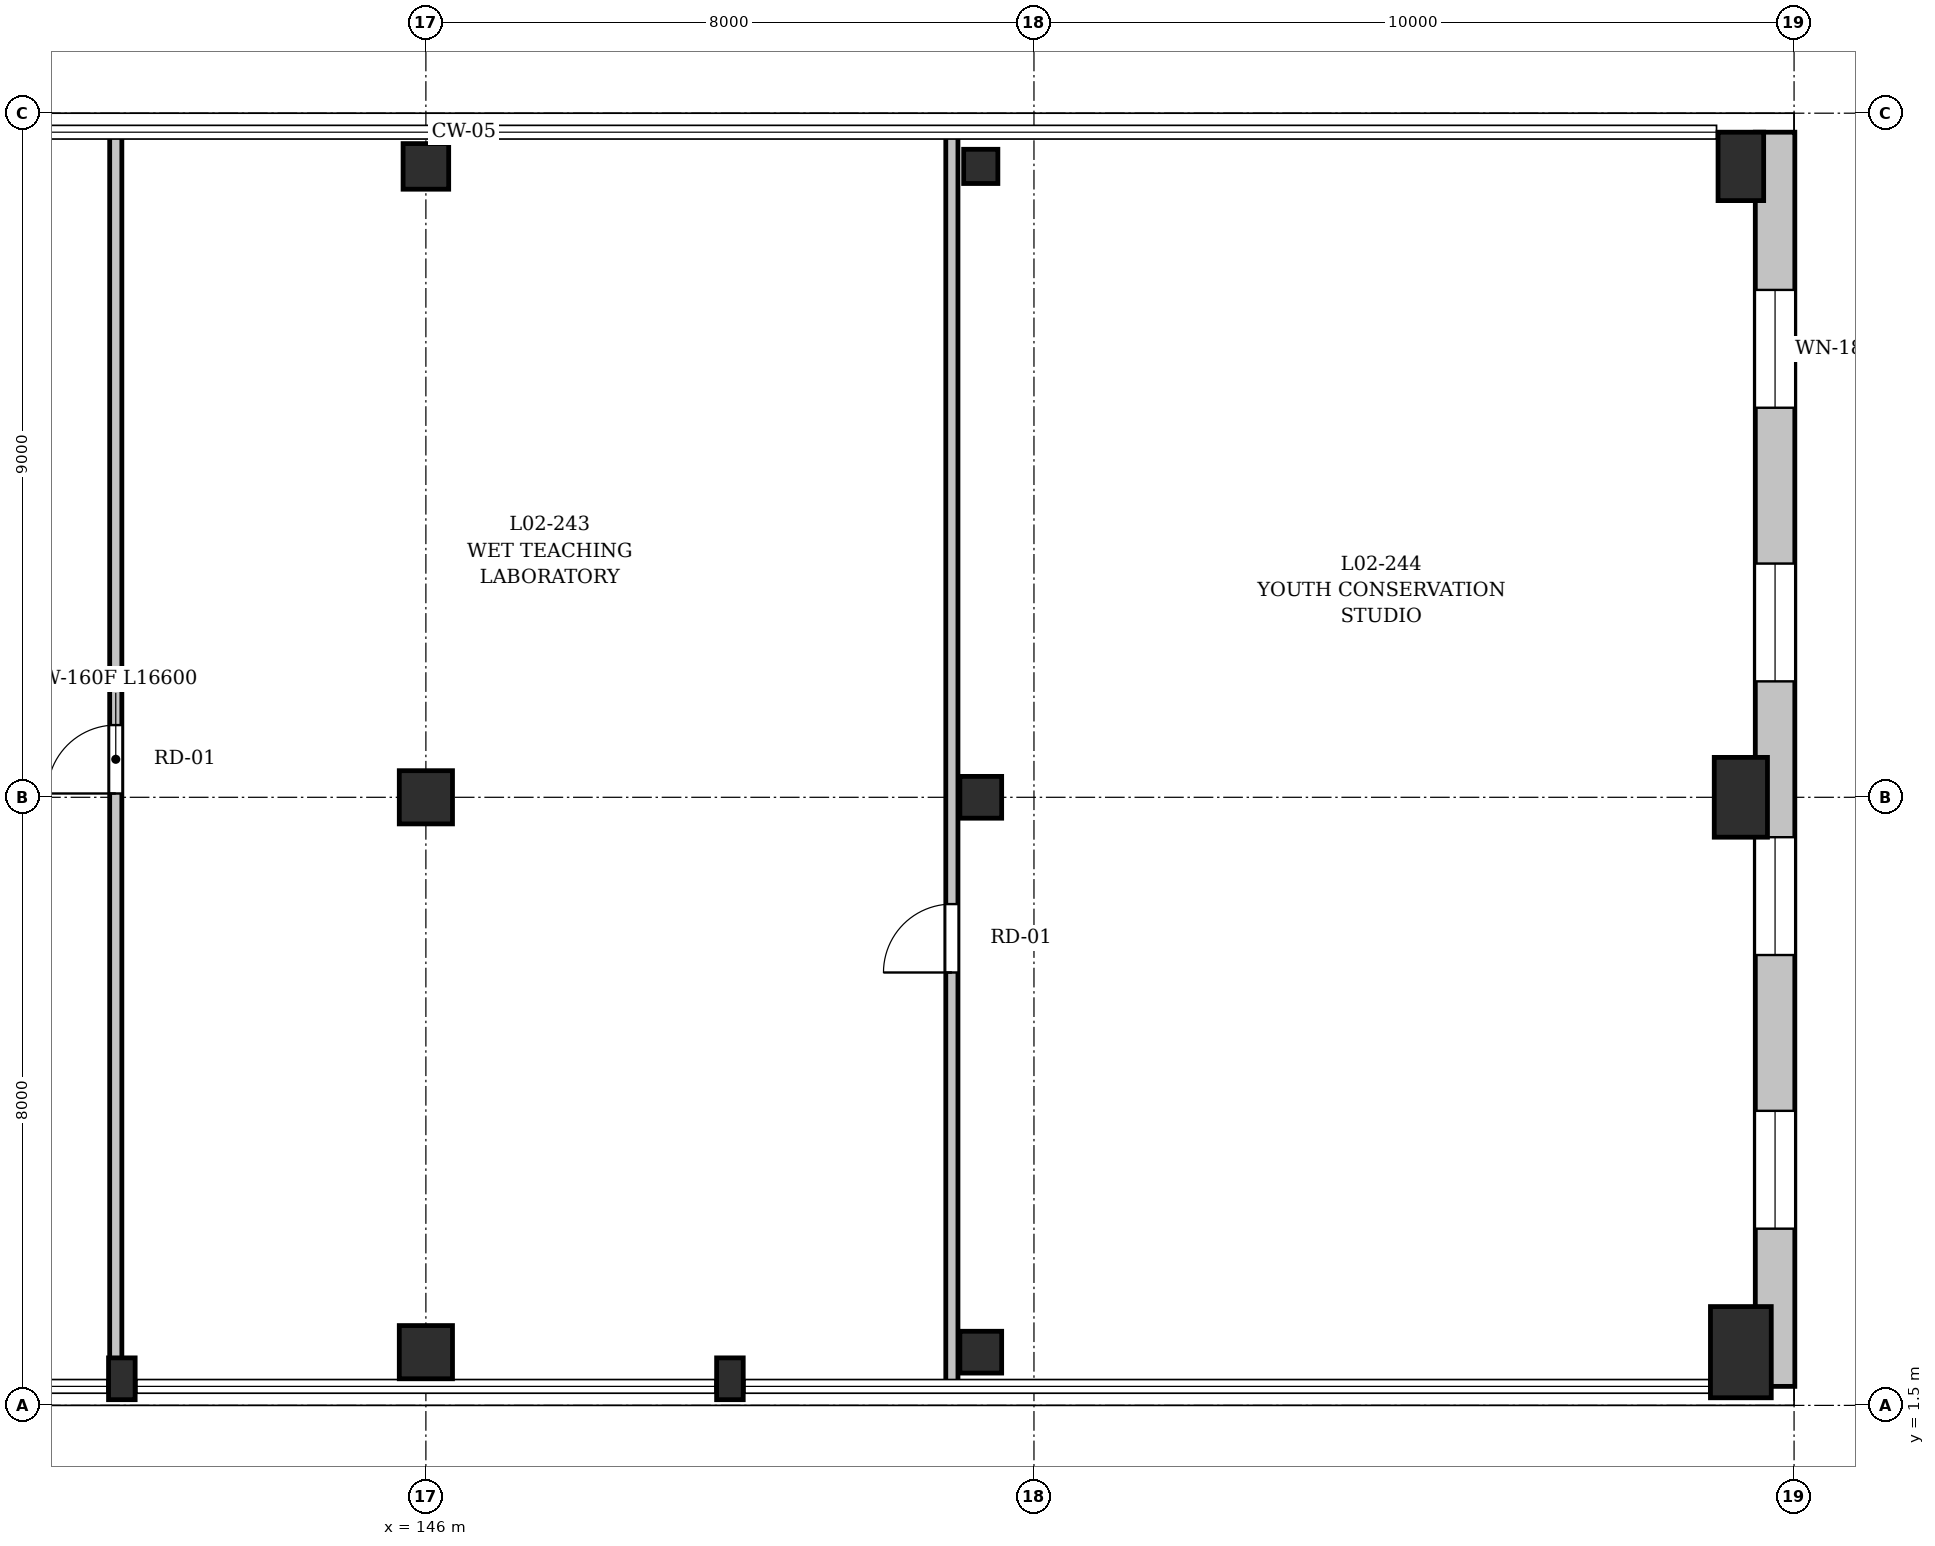
"""IFC4 building model, lengths in metres.
Left out: names, types, materials, properties, quantities, classifications, styles, units other than length and angle.
Written with IfcOpenShell. Run it as: python <this file> out.ifc"""

import sys

from ifc_helpers import new_model, si_unit, direction, frame, frame_2d, origin, origin_2d, place, context, subcontext, project, spatial, rectangle, extrude, element, fill, save


model = new_model("IFC4")
c1 = context("Model", 3, precision=1e-05, world=origin(), true_north=direction((0.0, 1.0)))
c2 = subcontext(c1, "Body", "Model", "MODEL_VIEW")
j1 = project(units=[si_unit("LENGTHUNIT", "METRE"), si_unit("PLANEANGLEUNIT", "RADIAN")], contexts=[c1])
p1 = place(None, origin())
s1 = spatial("IfcSite", under=j1, at=p1, CompositionType="ELEMENT")
p2 = place(p1, origin())
s2 = spatial("IfcBuilding", under=s1, at=p2, CompositionType="ELEMENT")
p3 = place(p2, frame((0.0, 0.0, 5.4)))
s3 = spatial("IfcBuildingStorey", under=s2, at=p3, CompositionType="ELEMENT", Elevation=5.4)
for number, where, z_axis, x_axis in (
    (1, (146.0, 2.2, 0.0), (0.0, 0.0, 1.0), (1.0, 0.0, 0.0)),
    (2, (146.0, 9.5, 0.0), (0.0, 0.0, 1.0), (1.0, 0.0, 0.0)),
):
    element("IfcColumn", number, at=place(p3, frame(where, z_axis=z_axis, x_axis=x_axis)), inside=s3, PredefinedType="COLUMN", context=c2, shape_type="SweptSolid", body=[
        extrude(rectangle(XDim=0.7, YDim=0.7, at=origin_2d()), origin(), (0.0, 0.0, 1.0), 4.52),
    ])
p4 = place(p3, frame((146.0, 17.8, 0.0), z_axis=(0.0, 0.0, 1.0), x_axis=(1.0, 0.0, 0.0)))
e3 = element("IfcColumn", 3, at=p4, inside=s3, PredefinedType="COLUMN", context=c2, shape_type="SweptSolid", body=[
    extrude(rectangle(XDim=0.6, YDim=0.6, at=origin_2d()), origin(), (0.0, 0.0, 1.0), 4.52),
])
for number, where, z_axis, x_axis in (
    (4, (153.3, 2.2, 0.0), (0.0, 0.0, 1.0), (1.0, 0.0, 0.0)),
    (5, (153.3, 9.5, 0.0), (0.0, 0.0, 1.0), (1.0, 0.0, 0.0)),
):
    element("IfcColumn", number, at=place(p3, frame(where, z_axis=z_axis, x_axis=x_axis)), inside=s3, PredefinedType="COLUMN", context=c2, shape_type="SweptSolid", body=[
        extrude(rectangle(XDim=0.55, YDim=0.55, at=origin_2d()), origin(), (0.0, 0.0, 1.0), 4.52),
    ])
p5 = place(p3, frame((153.3, 17.8, 0.0), z_axis=(0.0, 0.0, 1.0), x_axis=(1.0, 0.0, 0.0)))
e6 = element("IfcColumn", 6, at=p5, inside=s3, PredefinedType="COLUMN", context=c2, shape_type="SweptSolid", body=[
    extrude(rectangle(XDim=0.45, YDim=0.45, at=origin_2d()), origin(), (0.0, 0.0, 1.0), 4.52),
])
p6 = place(p3, frame((163.3, 2.2, 0.0), z_axis=(0.0, 0.0, 1.0), x_axis=(1.0, 0.0, 0.0)))
e7 = element("IfcColumn", 7, at=p6, inside=s3, PredefinedType="COLUMN", context=c2, shape_type="SweptSolid", body=[
    extrude(rectangle(XDim=0.8, YDim=1.2, at=origin_2d()), origin(), (0.0, 0.0, 1.0), 4.52),
])
p7 = place(p3, frame((163.3, 9.5, 0.0), z_axis=(0.0, 0.0, 1.0), x_axis=(1.0, 0.0, 0.0)))
e8 = element("IfcColumn", 8, at=p7, inside=s3, PredefinedType="COLUMN", context=c2, shape_type="SweptSolid", body=[
    extrude(rectangle(XDim=0.7, YDim=1.05, at=origin_2d()), origin(), (0.0, 0.0, 1.0), 4.52),
])
p8 = place(p3, frame((163.3, 17.8, 0.0), z_axis=(0.0, 0.0, 1.0), x_axis=(1.0, 0.0, 0.0)))
e9 = element("IfcColumn", 9, at=p8, inside=s3, PredefinedType="COLUMN", context=c2, shape_type="SweptSolid", body=[
    extrude(rectangle(XDim=0.6, YDim=0.9, at=origin_2d()), origin(), (0.0, 0.0, 1.0), 4.52),
])
for number, where, z_axis, x_axis in (
    (10, (142.0, 1.85, 0.0), (0.0, 0.0, 1.0), (1.0, 0.0, 0.0)),
    (11, (150.0, 1.85, 0.0), (0.0, 0.0, 1.0), (1.0, 0.0, 0.0)),
):
    element("IfcColumn", number, at=place(p3, frame(where, z_axis=z_axis, x_axis=x_axis)), inside=s3, PredefinedType="PILASTER", context=c2, shape_type="SweptSolid", body=[
        extrude(rectangle(XDim=0.35, YDim=0.55, at=origin_2d()), origin(), (0.0, 0.0, 1.0), 4.52),
    ])
p9 = place(p3, frame((163.75, 18.25, 0.0), z_axis=(0.0, 0.0, 1.0), x_axis=(0.0, -1.0, 0.0)))
e12 = element("IfcWall", 12, at=p9, inside=s3, PredefinedType="SOLIDWALL", context=c2, shape_type="SweptSolid", body=[
    extrude(rectangle(XDim=16.5, YDim=0.52, at=frame_2d((8.25, 0.0))), origin(), (0.0, 0.0, 1.0), 3.31),
])
p10 = place(p9, frame((2.075, 0.0, 0.9)))
e13 = element("IfcOpeningElement", 13, at=p10, cuts=e12, PredefinedType="OPENING", context=c2, shape_type="SweptSolid", body=[
    extrude(rectangle(XDim=1.55, YDim=1.85, at=frame_2d((0.775, 0.925))), frame((0.0, 0.27, 0.0), z_axis=(0.0, -1.0, 0.0), x_axis=(1.0, 0.0, 0.0)), (0.0, 0.0, 1.0), 0.54),
])
p11 = place(p9, frame((5.675, 0.0, 0.9)))
e14 = element("IfcOpeningElement", 14, at=p11, cuts=e12, PredefinedType="OPENING", context=c2, shape_type="SweptSolid", body=[
    extrude(rectangle(XDim=1.55, YDim=1.85, at=frame_2d((0.775, 0.925))), frame((0.0, 0.27, 0.0), z_axis=(0.0, -1.0, 0.0), x_axis=(1.0, 0.0, 0.0)), (0.0, 0.0, 1.0), 0.54),
])
p12 = place(p9, frame((9.275, 0.0, 0.9)))
e15 = element("IfcOpeningElement", 15, at=p12, cuts=e12, PredefinedType="OPENING", context=c2, shape_type="SweptSolid", body=[
    extrude(rectangle(XDim=1.55, YDim=1.85, at=frame_2d((0.775, 0.925))), frame((0.0, 0.27, 0.0), z_axis=(0.0, -1.0, 0.0), x_axis=(1.0, 0.0, 0.0)), (0.0, 0.0, 1.0), 0.54),
])
p13 = place(p9, frame((12.875, 0.0, 0.9)))
e16 = element("IfcOpeningElement", 16, at=p13, cuts=e12, PredefinedType="OPENING", context=c2, shape_type="SweptSolid", body=[
    extrude(rectangle(XDim=1.55, YDim=1.85, at=frame_2d((0.775, 0.925))), frame((0.0, 0.27, 0.0), z_axis=(0.0, -1.0, 0.0), x_axis=(1.0, 0.0, 0.0)), (0.0, 0.0, 1.0), 0.54),
])
p14 = place(p3, frame((141.92, 1.7, 0.0), z_axis=(0.0, 0.0, 1.0), x_axis=(0.0, 1.0, 0.0)))
e17 = element("IfcWall", 17, at=p14, inside=s3, PredefinedType="PARTITIONING", context=c2, shape_type="SweptSolid", body=[
    extrude(rectangle(XDim=16.6, YDim=0.16, at=frame_2d((8.3, 0.0))), origin(), (0.0, 0.0, 1.0), 3.66),
])
p15 = place(p14, frame((7.85, 0.0, 0.0)))
e18 = element("IfcOpeningElement", 18, at=p15, cuts=e17, PredefinedType="OPENING", context=c2, shape_type="SweptSolid", body=[
    extrude(rectangle(XDim=0.9, YDim=2.1, at=frame_2d((0.45, 1.05))), frame((0.0, 0.09, 0.0), z_axis=(0.0, -1.0, 0.0), x_axis=(1.0, 0.0, 0.0)), (0.0, 0.0, 1.0), 0.18),
])
p16 = place(p3, frame((152.92, 1.7, 0.0), z_axis=(0.0, 0.0, 1.0), x_axis=(0.0, 1.0, 0.0)))
e19 = element("IfcWall", 19, at=p16, inside=s3, PredefinedType="PARTITIONING", context=c2, shape_type="SweptSolid", body=[
    extrude(rectangle(XDim=16.6, YDim=0.16, at=frame_2d((8.3, 0.0))), origin(), (0.0, 0.0, 1.0), 3.21),
])
p17 = place(p16, frame((5.495, 0.0, 0.0)))
e20 = element("IfcOpeningElement", 20, at=p17, cuts=e19, PredefinedType="OPENING", context=c2, shape_type="SweptSolid", body=[
    extrude(rectangle(XDim=0.9, YDim=2.1, at=frame_2d((0.45, 1.05))), frame((0.0, 0.09, 0.0), z_axis=(0.0, -1.0, 0.0), x_axis=(1.0, 0.0, 0.0)), (0.0, 0.0, 1.0), 0.18),
])
p18 = place(p10, origin())
e21 = element("IfcWindow", 21, at=p18, inside=s3, PartitioningType="DOUBLE_PANEL_VERTICAL", PredefinedType="WINDOW", context=c2, shape_type="SweptSolid", body=[
    extrude(rectangle(XDim=1.55, YDim=1.85, at=frame_2d((0.775, 0.925))), frame((0.0, 0.03, 0.0), z_axis=(0.0, -1.0, 0.0), x_axis=(1.0, 0.0, 0.0)), (0.0, 0.0, 1.0), 0.06),
])
fill(e13, e21)
p19 = place(p11, origin())
e22 = element("IfcWindow", 22, at=p19, inside=s3, PartitioningType="DOUBLE_PANEL_VERTICAL", PredefinedType="WINDOW", context=c2, shape_type="SweptSolid", body=[
    extrude(rectangle(XDim=1.55, YDim=1.85, at=frame_2d((0.775, 0.925))), frame((0.0, 0.03, 0.0), z_axis=(0.0, -1.0, 0.0), x_axis=(1.0, 0.0, 0.0)), (0.0, 0.0, 1.0), 0.06),
])
fill(e14, e22)
p20 = place(p12, origin())
e23 = element("IfcWindow", 23, at=p20, inside=s3, PartitioningType="DOUBLE_PANEL_VERTICAL", PredefinedType="WINDOW", context=c2, shape_type="SweptSolid", body=[
    extrude(rectangle(XDim=1.55, YDim=1.85, at=frame_2d((0.775, 0.925))), frame((0.0, 0.03, 0.0), z_axis=(0.0, -1.0, 0.0), x_axis=(1.0, 0.0, 0.0)), (0.0, 0.0, 1.0), 0.06),
])
fill(e15, e23)
p21 = place(p13, origin())
e24 = element("IfcWindow", 24, at=p21, inside=s3, PartitioningType="DOUBLE_PANEL_VERTICAL", PredefinedType="WINDOW", context=c2, shape_type="SweptSolid", body=[
    extrude(rectangle(XDim=1.55, YDim=1.85, at=frame_2d((0.775, 0.925))), frame((0.0, 0.03, 0.0), z_axis=(0.0, -1.0, 0.0), x_axis=(1.0, 0.0, 0.0)), (0.0, 0.0, 1.0), 0.06),
])
fill(e16, e24)
p22 = place(p15, origin())
e25 = element("IfcDoor", 25, at=p22, inside=s3, OperationType="SINGLE_SWING_RIGHT", PredefinedType="DOOR", context=c2, shape_type="SweptSolid", body=[
    extrude(rectangle(XDim=0.9, YDim=2.1, at=frame_2d((0.45, 1.05))), frame((0.0, 0.025, 0.0), z_axis=(0.0, -1.0, 0.0), x_axis=(1.0, 0.0, 0.0)), (0.0, 0.0, 1.0), 0.05),
])
fill(e18, e25)
p23 = place(p17, origin())
e26 = element("IfcDoor", 26, at=p23, inside=s3, OperationType="SINGLE_SWING_RIGHT", PredefinedType="DOOR", context=c2, shape_type="SweptSolid", body=[
    extrude(rectangle(XDim=0.9, YDim=2.1, at=frame_2d((0.45, 1.05))), frame((0.0, 0.025, 0.0), z_axis=(0.0, -1.0, 0.0), x_axis=(1.0, 0.0, 0.0)), (0.0, 0.0, 1.0), 0.05),
])
fill(e20, e26)
save(model, sys.argv[1])
